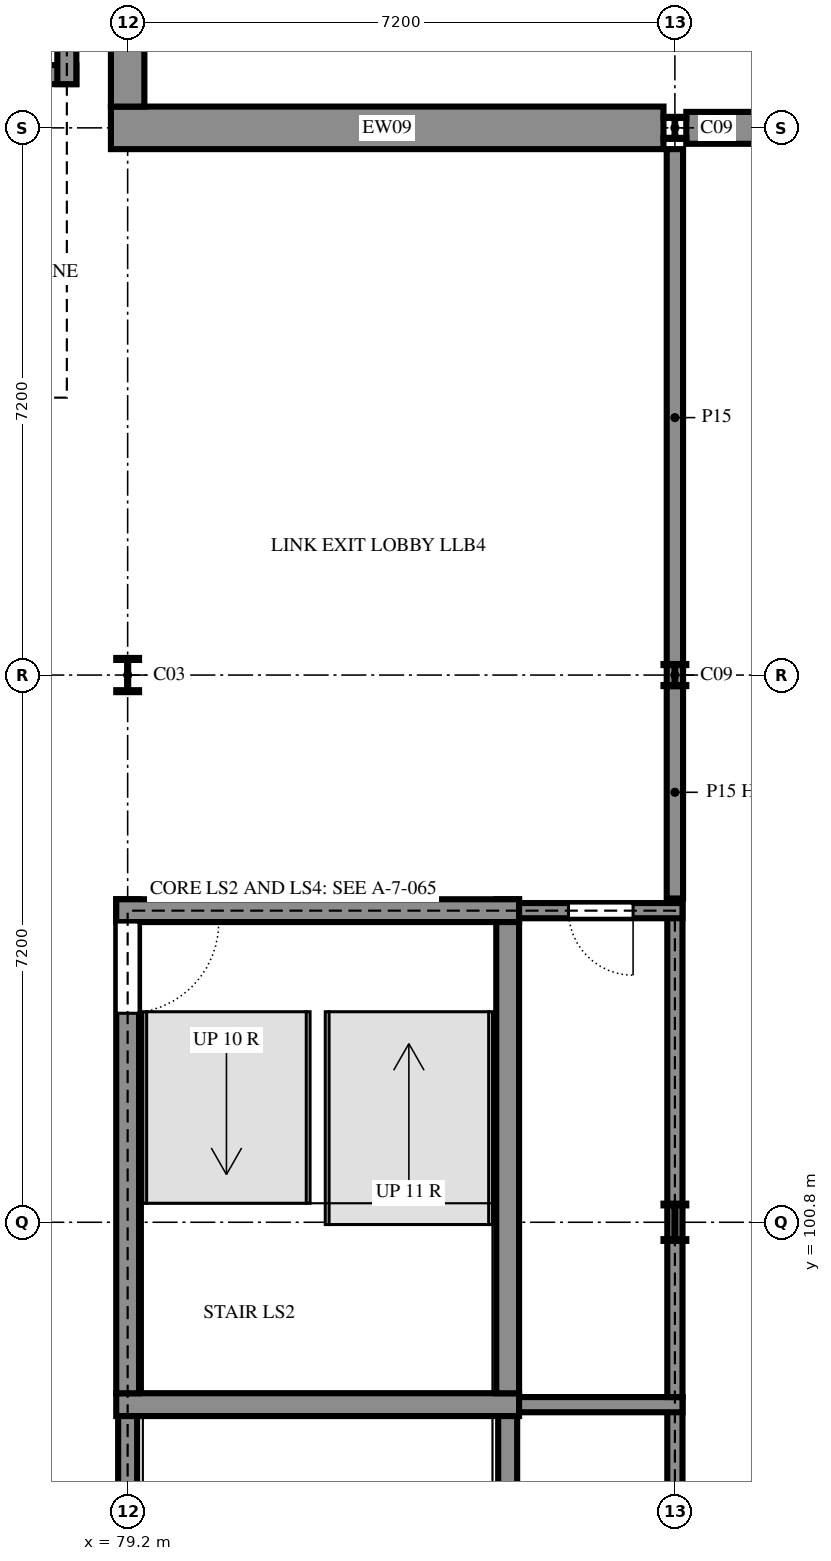
"""IFC4 building model, lengths in metres.
Left out: names, types, materials, properties, quantities, classifications, styles, units other than length and angle.
Written with IfcOpenShell. Run it as: python <this file> out.ifc"""

import sys

from ifc_helpers import new_model, si_unit, direction, frame, frame_2d, origin, origin_2d, place, context, subcontext, project, spatial, rectangle, i_section, extrude, element, fill, save


model = new_model("IFC4")
c1 = context("Model", 3, precision=1e-05, world=origin(), true_north=direction((0.0, 1.0)))
c2 = subcontext(c1, "Body", "Model", "MODEL_VIEW")
j1 = project(units=[si_unit("LENGTHUNIT", "METRE"), si_unit("PLANEANGLEUNIT", "RADIAN")], contexts=[c1])
p1 = place(None, origin())
s1 = spatial("IfcSite", under=j1, at=p1, CompositionType="ELEMENT")
p2 = place(p1, origin())
s2 = spatial("IfcBuilding", under=s1, at=p2, CompositionType="ELEMENT")
p3 = place(p2, frame((0.0, 0.0, 7.2)))
s3 = spatial("IfcBuildingStorey", under=s2, at=p3, CompositionType="ELEMENT", Elevation=7.2)
p4 = place(p3, frame((79.2, 108.0, 0.0), z_axis=(0.0, 0.0, 1.0), x_axis=(1.0, 0.0, 0.0)))
e1 = element("IfcColumn", 1, at=p4, inside=s3, PredefinedType="COLUMN", context=c2, shape_type="SweptSolid", body=[
    extrude(i_section(OverallWidth=0.3, OverallDepth=0.45, WebThickness=0.014, FlangeThickness=0.026, FilletRadius=0.027, at=origin_2d()), origin(), (0.0, 0.0, 1.0), 3.6),
])
p5 = place(p3, frame((86.4, 100.8, 0.0), z_axis=(0.0, 0.0, 1.0), x_axis=(1.0, 0.0, 0.0)))
e2 = element("IfcColumn", 2, at=p5, inside=s3, PredefinedType="COLUMN", context=c2, shape_type="SweptSolid", body=[
    extrude(i_section(OverallWidth=0.3, OverallDepth=0.49, WebThickness=0.012, FlangeThickness=0.023, FilletRadius=0.027, at=origin_2d()), origin(), (0.0, 0.0, 1.0), 3.6),
])
for number, where, z_axis, x_axis in (
    (3, (86.4, 108.0, 0.0), (0.0, 0.0, 1.0), (1.0, 0.0, 0.0)),
    (4, (86.4, 115.2, 0.0), (0.0, 0.0, 1.0), (1.0, 0.0, 0.0)),
):
    element("IfcColumn", number, at=place(p3, frame(where, z_axis=z_axis, x_axis=x_axis)), inside=s3, PredefinedType="COLUMN", context=c2, shape_type="SweptSolid", body=[
        extrude(i_section(OverallWidth=0.3, OverallDepth=0.29, WebThickness=0.009, FlangeThickness=0.014, FilletRadius=0.027, at=origin_2d()), origin(), (0.0, 0.0, 1.0), 3.6),
    ])
p6 = place(p3, frame((84.2, 91.775, 0.0), z_axis=(0.0, 0.0, 1.0), x_axis=(0.0, 1.0, 0.0)))
e5 = element("IfcWall", 5, at=p6, inside=s3, PredefinedType="SHEAR", context=c2, shape_type="SweptSolid", body=[
    extrude(rectangle(XDim=6.775, YDim=0.25, at=frame_2d((3.388, 0.0))), origin(), (0.0, 0.0, 1.0), 3.6),
])
p7 = place(p3, frame((86.4, 91.8, 0.0), z_axis=(0.0, 0.0, 1.0), x_axis=(0.0, 1.0, 0.0)))
e6 = element("IfcWall", 6, at=p7, inside=s3, PredefinedType="SHEAR", context=c2, shape_type="SweptSolid", body=[
    extrude(rectangle(XDim=6.7, YDim=0.2, at=frame_2d((3.35, 0.0))), origin(), (0.0, 0.0, 1.0), 3.6),
])
p8 = place(p3, frame((79.2, 98.55, 0.0), z_axis=(0.0, 0.0, 1.0), x_axis=(0.0, -1.0, 0.0)))
e7 = element("IfcWall", 7, at=p8, inside=s3, PredefinedType="SHEAR", context=c2, shape_type="SweptSolid", body=[
    extrude(rectangle(XDim=6.775, YDim=0.25, at=frame_2d((3.388, 0.0))), origin(), (0.0, 0.0, 1.0), 3.6),
])
p9 = place(p8, frame((5.3, 0.0, 0.0)))
e8 = element("IfcOpeningElement", 8, at=p9, cuts=e7, PredefinedType="OPENING", context=c2, shape_type="SweptSolid", body=[
    extrude(rectangle(XDim=1.2, YDim=2.4, at=frame_2d((0.6, 1.2))), frame((0.0, 0.135, 0.0), z_axis=(0.0, -1.0, 0.0), x_axis=(1.0, 0.0, 0.0)), (0.0, 0.0, 1.0), 0.27),
])
p10 = place(p3, frame((84.35, 98.4, 0.0), z_axis=(0.0, 0.0, 1.0), x_axis=(-1.0, 0.0, 0.0)))
e9 = element("IfcWall", 9, at=p10, inside=s3, PredefinedType="SHEAR", context=c2, shape_type="SweptSolid", body=[
    extrude(rectangle(XDim=5.3, YDim=0.3, at=frame_2d((2.65, 0.0))), origin(), (0.0, 0.0, 1.0), 3.6),
])
p11 = place(p3, frame((84.35, 98.4, 0.0), z_axis=(0.0, 0.0, 1.0), x_axis=(1.0, 0.0, 0.0)))
e10 = element("IfcWall", 10, at=p11, inside=s3, PredefinedType="SHEAR", context=c2, shape_type="SweptSolid", body=[
    extrude(rectangle(XDim=2.15, YDim=0.2, at=frame_2d((1.075, 0.0))), origin(), (0.0, 0.0, 1.0), 3.6),
])
p12 = place(p3, frame((84.2, 98.55, 0.0), z_axis=(0.0, 0.0, 1.0), x_axis=(0.0, 1.0, 0.0)))
e11 = element("IfcWall", 11, at=p12, inside=s3, PredefinedType="SHEAR", context=c2, shape_type="SweptSolid", body=[
    extrude(rectangle(XDim=6.5, YDim=0.3, at=frame_2d((3.25, 0.0))), origin(), (0.0, 0.0, 1.0), 3.6),
])
p13 = place(p3, frame((86.4, 98.5, 0.0), z_axis=(0.0, 0.0, 1.0), x_axis=(0.0, 1.0, 0.0)))
e12 = element("IfcWall", 12, at=p13, inside=s3, PredefinedType="SHEAR", context=c2, shape_type="SweptSolid", body=[
    extrude(rectangle(XDim=6.5, YDim=0.2, at=frame_2d((3.25, 0.0))), origin(), (0.0, 0.0, 1.0), 3.6),
])
p14 = place(p3, frame((79.2, 105.05, 0.0), z_axis=(0.0, 0.0, 1.0), x_axis=(0.0, -1.0, 0.0)))
e13 = element("IfcWall", 13, at=p14, inside=s3, PredefinedType="SHEAR", context=c2, shape_type="SweptSolid", body=[
    extrude(rectangle(XDim=6.5, YDim=0.3, at=frame_2d((3.25, 0.0))), origin(), (0.0, 0.0, 1.0), 3.6),
])
p15 = place(p14, frame((0.3, 0.0, 0.0)))
e14 = element("IfcOpeningElement", 14, at=p15, cuts=e13, PredefinedType="OPENING", context=c2, shape_type="SweptSolid", body=[
    extrude(rectangle(XDim=1.2, YDim=2.4, at=frame_2d((0.6, 1.2))), frame((0.0, 0.16, 0.0), z_axis=(0.0, -1.0, 0.0), x_axis=(1.0, 0.0, 0.0)), (0.0, 0.0, 1.0), 0.32),
])
p16 = place(p3, frame((84.35, 104.9, 0.0), z_axis=(0.0, 0.0, 1.0), x_axis=(-1.0, 0.0, 0.0)))
e15 = element("IfcWall", 15, at=p16, inside=s3, PredefinedType="SHEAR", context=c2, shape_type="SweptSolid", body=[
    extrude(rectangle(XDim=5.3, YDim=0.3, at=frame_2d((2.65, 0.0))), origin(), (0.0, 0.0, 1.0), 3.6),
])
p17 = place(p3, frame((86.5, 104.9, 0.0), z_axis=(0.0, 0.0, 1.0), x_axis=(-1.0, 0.0, 0.0)))
e16 = element("IfcWall", 16, at=p17, inside=s3, PredefinedType="SHEAR", context=c2, shape_type="SweptSolid", body=[
    extrude(rectangle(XDim=2.15, YDim=0.2, at=frame_2d((1.075, 0.0))), origin(), (0.0, 0.0, 1.0), 3.6),
])
p18 = place(p17, frame((0.65, 0.0, 0.0)))
e17 = element("IfcOpeningElement", 17, at=p18, cuts=e16, PredefinedType="OPENING", context=c2, shape_type="SweptSolid", body=[
    extrude(rectangle(XDim=0.85, YDim=2.1, at=frame_2d((0.425, 1.05))), frame((0.0, 0.11, 0.0), z_axis=(0.0, -1.0, 0.0), x_axis=(1.0, 0.0, 0.0)), (0.0, 0.0, 1.0), 0.22),
])
p19 = place(p3, frame((73.525, 115.9, 0.0), z_axis=(0.0, 0.0, 1.0), x_axis=(1.0, 0.0, 0.0)))
e18 = element("IfcWall", 18, at=p19, inside=s3, PredefinedType="SHEAR", context=c2, shape_type="SweptSolid", body=[
    extrude(rectangle(XDim=5.0, YDim=0.25, at=frame_2d((2.5, 0.0))), origin(), (0.0, 0.0, 1.0), 3.6),
])
p20 = place(p19, frame((1.825, 0.0, 0.0)))
e19 = element("IfcOpeningElement", 19, at=p20, cuts=e18, PredefinedType="OPENING", context=c2, shape_type="SweptSolid", body=[
    extrude(rectangle(XDim=1.2, YDim=2.4, at=frame_2d((0.6, 1.2))), frame((0.0, 0.135, 0.0), z_axis=(0.0, -1.0, 0.0), x_axis=(1.0, 0.0, 0.0)), (0.0, 0.0, 1.0), 0.27),
])
p21 = place(p3, frame((78.4, 115.775, 0.0), z_axis=(0.0, 0.0, 1.0), x_axis=(0.0, 1.0, 0.0)))
e20 = element("IfcWall", 20, at=p21, inside=s3, PredefinedType="SHEAR", context=c2, shape_type="SweptSolid", body=[
    extrude(rectangle(XDim=6.75, YDim=0.25, at=frame_2d((3.375, 0.0))), origin(), (0.0, 0.0, 1.0), 3.6),
])
p22 = place(p3, frame((93.45, 115.2, 0.0), z_axis=(0.0, 0.0, 1.0), x_axis=(-1.0, 0.0, 0.0)))
e21 = element("IfcWall", 21, at=p22, inside=s3, PredefinedType="SOLIDWALL", context=c2, shape_type="SweptSolid", body=[
    extrude(rectangle(XDim=6.9, YDim=0.42, at=frame_2d((3.45, 0.0))), origin(), (0.0, 0.0, 1.0), 3.6),
])
p23 = place(p22, frame((1.65, 0.0, 1.2)))
e22 = element("IfcOpeningElement", 22, at=p23, cuts=e21, PredefinedType="OPENING", context=c2, shape_type="SweptSolid", body=[
    extrude(rectangle(XDim=3.6, YDim=1.2, at=frame_2d((1.8, 0.6))), frame((0.0, 0.22, 0.0), z_axis=(0.0, -1.0, 0.0), x_axis=(1.0, 0.0, 0.0)), (0.0, 0.0, 1.0), 0.44),
])
p24 = place(p3, frame((86.25, 115.2, 0.0), z_axis=(0.0, 0.0, 1.0), x_axis=(-1.0, 0.0, 0.0)))
e23 = element("IfcWall", 23, at=p24, inside=s3, PredefinedType="SOLIDWALL", context=c2, shape_type="SweptSolid", body=[
    extrude(rectangle(XDim=7.27, YDim=0.56, at=frame_2d((3.635, 0.0))), origin(), (0.0, 0.0, 1.0), 3.12),
])
p25 = place(p3, frame((79.2, 115.48, 0.0), z_axis=(0.0, 0.0, 1.0), x_axis=(0.0, 1.0, 0.0)))
e24 = element("IfcWall", 24, at=p25, inside=s3, PredefinedType="SOLIDWALL", context=c2, shape_type="SweptSolid", body=[
    extrude(rectangle(XDim=6.704, YDim=0.44, at=frame_2d((3.352, 0.0))), origin(), (0.0, 0.0, 1.0), 2.82),
])
p26 = place(p3, frame((86.4, 105.06, 0.0), z_axis=(0.0, 0.0, 1.0), x_axis=(0.0, 1.0, 0.0)))
e25 = element("IfcWall", 25, at=p26, inside=s3, PredefinedType="PARTITIONING", context=c2, shape_type="SweptSolid", body=[
    extrude(rectangle(XDim=2.795, YDim=0.215, at=frame_2d((1.397, 0.0))), origin(), (0.0, 0.0, 1.0), 3.6),
])
p27 = place(p3, frame((86.4, 107.855, 0.0), z_axis=(0.0, 0.0, 1.0), x_axis=(0.0, 1.0, 0.0)))
e26 = element("IfcWall", 26, at=p27, inside=s3, PredefinedType="PARTITIONING", context=c2, shape_type="SweptSolid", body=[
    extrude(rectangle(XDim=7.065, YDim=0.215, at=frame_2d((3.532, 0.0))), origin(), (0.0, 0.0, 1.0), 3.12),
])
p28 = place(p15, origin())
e27 = element("IfcDoor", 27, at=p28, inside=s3, OperationType="SINGLE_SWING_RIGHT", PredefinedType="DOOR", context=c2, shape_type="SweptSolid", body=[
    extrude(rectangle(XDim=1.2, YDim=2.4, at=frame_2d((0.6, 1.2))), frame((0.0, 0.025, 0.0), z_axis=(0.0, -1.0, 0.0), x_axis=(1.0, 0.0, 0.0)), (0.0, 0.0, 1.0), 0.05),
])
fill(e14, e27)
p29 = place(p18, origin())
e28 = element("IfcDoor", 28, at=p29, inside=s3, OperationType="SINGLE_SWING_RIGHT", PredefinedType="DOOR", context=c2, shape_type="SweptSolid", body=[
    extrude(rectangle(XDim=0.85, YDim=2.1, at=frame_2d((0.425, 1.05))), frame((0.0, 0.025, 0.0), z_axis=(0.0, -1.0, 0.0), x_axis=(1.0, 0.0, 0.0)), (0.0, 0.0, 1.0), 0.05),
])
fill(e17, e28)
save(model, sys.argv[1])
